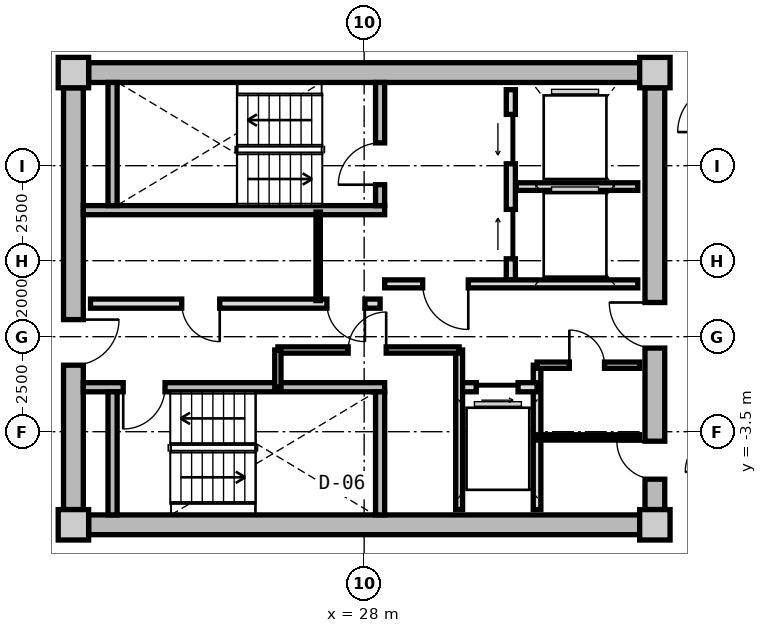
"""IFC4 building model, lengths in metres.
Left out: names, types, materials, properties, quantities, classifications, styles, units other than length and angle.
Written with IfcOpenShell. Run it as: python <this file> out.ifc"""

import sys

from ifc_helpers import new_model, si_unit, direction, frame, frame_2d, origin, origin_2d, place, context, subcontext, project, spatial, rectangle, extrude, source, transform, mapped, element, fill, save


model = new_model("IFC4")
c1 = context("Model", 3, precision=1e-05, world=origin(), true_north=direction((0.0, 1.0)))
c2 = subcontext(c1, "Body", "Model", "MODEL_VIEW")
j1 = project(units=[si_unit("LENGTHUNIT", "METRE"), si_unit("PLANEANGLEUNIT", "RADIAN")], contexts=[c1])
p1 = place(None, origin())
s1 = spatial("IfcSite", under=j1, at=p1, CompositionType="ELEMENT")
p2 = place(p1, origin())
s2 = spatial("IfcBuilding", under=s1, at=p2, CompositionType="ELEMENT")
p3 = place(p2, frame((0.0, 0.0, 226.1)))
s3 = spatial("IfcBuildingStorey", under=s2, at=p3, CompositionType="ELEMENT", Elevation=226.1)
m1 = source(origin(), c2, "Body", "SweptSolid", [
    extrude(rectangle(XDim=0.8, YDim=0.8, at=origin_2d()), origin(), (0.0, 0.0, 1.0), 3.05),
])
for number, where, z_axis, x_axis in (
    (1, (20.35, -5.95, 0.0), (0.0, 0.0, 1.0), (1.0, 0.0, 0.0)),
    (2, (35.65, -5.95, 0.0), (0.0, 0.0, 1.0), (1.0, 0.0, 0.0)),
    (3, (35.65, 5.95, 0.0), (0.0, 0.0, 1.0), (1.0, 0.0, 0.0)),
    (4, (20.35, 5.95, 0.0), (0.0, 0.0, 1.0), (1.0, 0.0, 0.0)),
):
    element("IfcColumn", number, at=place(p3, frame(where, z_axis=z_axis, x_axis=x_axis)), inside=s3, PredefinedType="COLUMN", context=c2, shape_type="MappedRepresentation", body=[
        mapped(m1, transform((0.0, 0.0, 0.0), x_axis=(1.0, 0.0, 0.0), y_axis=(0.0, 1.0, 0.0), z_axis=(0.0, 0.0, 1.0), scale=1.0)),
    ])
m2 = source(origin(), c2, "Body", "SweptSolid", [
    extrude(rectangle(XDim=14.5, YDim=0.52, at=frame_2d((7.25, 0.0))), origin(), (0.0, 0.0, 1.0), 2.76),
])
for number, where, z_axis, x_axis in (
    (5, (20.75, 5.95, 0.0), (0.0, 0.0, 1.0), (1.0, 0.0, 0.0)),
    (6, (35.25, -5.95, 0.0), (0.0, 0.0, 1.0), (-1.0, 0.0, 0.0)),
):
    element("IfcWall", number, at=place(p3, frame(where, z_axis=z_axis, x_axis=x_axis)), inside=s3, PredefinedType="SHEAR", context=c2, shape_type="MappedRepresentation", body=[
        mapped(m2, transform((0.0, 0.0, 0.0), x_axis=(1.0, 0.0, 0.0), y_axis=(0.0, 1.0, 0.0), z_axis=(0.0, 0.0, 1.0), scale=1.0)),
    ])
m3 = source(origin(), c2, "Body", "SweptSolid", [
    extrude(rectangle(XDim=11.1, YDim=0.52, at=frame_2d((5.55, 0.0))), origin(), (0.0, 0.0, 1.0), 2.76),
])
p4 = place(p3, frame((20.35, -5.55, 0.0), z_axis=(0.0, 0.0, 1.0), x_axis=(0.0, 1.0, 0.0)))
e7 = element("IfcWall", 7, at=p4, inside=s3, PredefinedType="SHEAR", context=c2, shape_type="MappedRepresentation", body=[
    mapped(m3, transform((0.0, 0.0, 0.0), x_axis=(1.0, 0.0, 0.0), y_axis=(0.0, 1.0, 0.0), z_axis=(0.0, 0.0, 1.0), scale=1.0)),
])
p5 = place(p4, frame((3.8, 0.0, 0.0)))
e8 = element("IfcOpeningElement", 8, at=p5, cuts=e7, PredefinedType="OPENING", context=c2, shape_type="SweptSolid", body=[
    extrude(rectangle(XDim=1.2, YDim=2.15, at=frame_2d((0.6, 1.075))), frame((0.0, 0.27, 0.0), z_axis=(0.0, -1.0, 0.0), x_axis=(1.0, 0.0, 0.0)), (0.0, 0.0, 1.0), 0.54),
])
p6 = place(p3, frame((35.65, 5.55, 0.0), z_axis=(0.0, 0.0, 1.0), x_axis=(0.0, -1.0, 0.0)))
e9 = element("IfcWall", 9, at=p6, inside=s3, PredefinedType="SHEAR", context=c2, shape_type="MappedRepresentation", body=[
    mapped(m3, transform((0.0, 0.0, 0.0), x_axis=(1.0, 0.0, 0.0), y_axis=(0.0, 1.0, 0.0), z_axis=(0.0, 0.0, 1.0), scale=1.0)),
])
p7 = place(p6, frame((5.65, 0.0, 0.0)))
e10 = element("IfcOpeningElement", 10, at=p7, cuts=e9, PredefinedType="OPENING", context=c2, shape_type="SweptSolid", body=[
    extrude(rectangle(XDim=1.2, YDim=2.15, at=frame_2d((0.6, 1.075))), frame((0.0, 0.27, 0.0), z_axis=(0.0, -1.0, 0.0), x_axis=(1.0, 0.0, 0.0)), (0.0, 0.0, 1.0), 0.54),
])
p8 = place(p6, frame((9.3, 0.0, 0.0)))
e11 = element("IfcOpeningElement", 11, at=p8, cuts=e9, PredefinedType="OPENING", context=c2, shape_type="SweptSolid", body=[
    extrude(rectangle(XDim=1.0, YDim=2.1, at=frame_2d((0.5, 1.05))), frame((0.0, 0.27, 0.0), z_axis=(0.0, -1.0, 0.0), x_axis=(1.0, 0.0, 0.0)), (0.0, 0.0, 1.0), 0.54),
])
m4 = source(origin(), c2, "Body", "SweptSolid", [
    extrude(rectangle(XDim=7.93, YDim=0.24, at=frame_2d((3.965, 0.0))), origin(), (0.0, 0.0, 1.0), 2.76),
])
p9 = place(p3, frame((20.61, 2.33, 0.0), z_axis=(0.0, 0.0, 1.0), x_axis=(1.0, 0.0, 0.0)))
e12 = element("IfcWall", 12, at=p9, inside=s3, PredefinedType="PARTITIONING", context=c2, shape_type="MappedRepresentation", body=[
    mapped(m4, transform((0.0, 0.0, 0.0), x_axis=(1.0, 0.0, 0.0), y_axis=(0.0, 1.0, 0.0), z_axis=(0.0, 0.0, 1.0), scale=1.0)),
])
m5 = source(origin(), c2, "Body", "SweptSolid", [
    extrude(rectangle(XDim=3.24, YDim=0.24, at=frame_2d((1.62, 0.0))), origin(), (0.0, 0.0, 1.0), 2.76),
])
p10 = place(p3, frame((21.38, 2.45, 0.0), z_axis=(0.0, 0.0, 1.0), x_axis=(0.0, 1.0, 0.0)))
e13 = element("IfcWall", 13, at=p10, inside=s3, PredefinedType="PARTITIONING", context=c2, shape_type="MappedRepresentation", body=[
    mapped(m5, transform((0.0, 0.0, 0.0), x_axis=(1.0, 0.0, 0.0), y_axis=(0.0, 1.0, 0.0), z_axis=(0.0, 0.0, 1.0), scale=1.0)),
])
p11 = place(p3, frame((28.42, 2.45, 0.0), z_axis=(0.0, 0.0, 1.0), x_axis=(0.0, 1.0, 0.0)))
e14 = element("IfcWall", 14, at=p11, inside=s3, PredefinedType="PARTITIONING", context=c2, shape_type="MappedRepresentation", body=[
    mapped(m5, transform((0.0, 0.0, 0.0), x_axis=(1.0, 0.0, 0.0), y_axis=(0.0, 1.0, 0.0), z_axis=(0.0, 0.0, 1.0), scale=1.0)),
])
p12 = place(p11, frame((0.55, 0.0, 0.0)))
e15 = element("IfcOpeningElement", 15, at=p12, cuts=e14, PredefinedType="OPENING", context=c2, shape_type="SweptSolid", body=[
    extrude(rectangle(XDim=1.1, YDim=2.15, at=frame_2d((0.55, 1.075))), frame((0.0, 0.13, 0.0), z_axis=(0.0, -1.0, 0.0), x_axis=(1.0, 0.0, 0.0)), (0.0, 0.0, 1.0), 0.26),
])
p13 = place(p3, frame((20.61, -2.33, 0.0), z_axis=(0.0, 0.0, 1.0), x_axis=(1.0, 0.0, 0.0)))
e16 = element("IfcWall", 16, at=p13, inside=s3, PredefinedType="PARTITIONING", context=c2, shape_type="MappedRepresentation", body=[
    mapped(m4, transform((0.0, 0.0, 0.0), x_axis=(1.0, 0.0, 0.0), y_axis=(0.0, 1.0, 0.0), z_axis=(0.0, 0.0, 1.0), scale=1.0)),
])
p14 = place(p13, frame((1.05, 0.0, 0.0)))
e17 = element("IfcOpeningElement", 17, at=p14, cuts=e16, PredefinedType="OPENING", context=c2, shape_type="SweptSolid", body=[
    extrude(rectangle(XDim=1.1, YDim=2.15, at=frame_2d((0.55, 1.075))), frame((0.0, 0.13, 0.0), z_axis=(0.0, -1.0, 0.0), x_axis=(1.0, 0.0, 0.0)), (0.0, 0.0, 1.0), 0.26),
])
for number, where, z_axis, x_axis in (
    (18, (21.38, -5.69, 0.0), (0.0, 0.0, 1.0), (0.0, 1.0, 0.0)),
    (19, (28.42, -5.69, 0.0), (0.0, 0.0, 1.0), (0.0, 1.0, 0.0)),
):
    element("IfcWall", number, at=place(p3, frame(where, z_axis=z_axis, x_axis=x_axis)), inside=s3, PredefinedType="PARTITIONING", context=c2, shape_type="MappedRepresentation", body=[
        mapped(m5, transform((0.0, 0.0, 0.0), x_axis=(1.0, 0.0, 0.0), y_axis=(0.0, 1.0, 0.0), z_axis=(0.0, 0.0, 1.0), scale=1.0)),
    ])
m6 = source(origin(), c2, "Body", "SweptSolid", [
    extrude(rectangle(XDim=5.0, YDim=0.24, at=frame_2d((2.5, 0.0))), origin(), (0.0, 0.0, 1.0), 2.745),
])
p15 = place(p3, frame((31.86, 0.5, 0.0), z_axis=(0.0, 0.0, 1.0), x_axis=(0.0, 1.0, 0.0)))
e20 = element("IfcWall", 20, at=p15, inside=s3, PredefinedType="PARTITIONING", context=c2, shape_type="MappedRepresentation", body=[
    mapped(m6, transform((0.0, 0.0, 0.0), x_axis=(1.0, 0.0, 0.0), y_axis=(0.0, 1.0, 0.0), z_axis=(0.0, 0.0, 1.0), scale=1.0)),
])
p16 = place(p15, frame((3.05, 0.0, 0.0)))
e21 = element("IfcOpeningElement", 21, at=p16, cuts=e20, PredefinedType="OPENING", context=c2, shape_type="SweptSolid", body=[
    extrude(rectangle(XDim=1.3, YDim=2.2, at=frame_2d((0.65, 1.1))), frame((0.0, 0.13, 0.0), z_axis=(0.0, -1.0, 0.0), x_axis=(1.0, 0.0, 0.0)), (0.0, 0.0, 1.0), 0.26),
])
p17 = place(p15, frame((0.55, 0.0, 0.0)))
e22 = element("IfcOpeningElement", 22, at=p17, cuts=e20, PredefinedType="OPENING", context=c2, shape_type="SweptSolid", body=[
    extrude(rectangle(XDim=1.3, YDim=2.2, at=frame_2d((0.65, 1.1))), frame((0.0, 0.13, 0.0), z_axis=(0.0, -1.0, 0.0), x_axis=(1.0, 0.0, 0.0)), (0.0, 0.0, 1.0), 0.26),
])
m7 = source(origin(), c2, "Body", "SweptSolid", [
    extrude(rectangle(XDim=3.2, YDim=0.2, at=frame_2d((1.6, 0.0))), origin(), (0.0, 0.0, 1.0), 2.745),
])
p18 = place(p3, frame((32.0, 2.95, 0.0), z_axis=(0.0, 0.0, 1.0), x_axis=(1.0, 0.0, 0.0)))
e23 = element("IfcWall", 23, at=p18, inside=s3, PredefinedType="PARTITIONING", context=c2, shape_type="MappedRepresentation", body=[
    mapped(m7, transform((0.0, 0.0, 0.0), x_axis=(1.0, 0.0, 0.0), y_axis=(0.0, 1.0, 0.0), z_axis=(0.0, 0.0, 1.0), scale=1.0)),
])
m8 = source(origin(), c2, "Body", "SweptSolid", [
    extrude(rectangle(XDim=6.66, YDim=0.21, at=frame_2d((3.33, 0.0))), origin(), (0.0, 0.0, 1.0), 2.745),
])
p19 = place(p3, frame((28.54, 0.39, 0.0), z_axis=(0.0, 0.0, 1.0), x_axis=(1.0, 0.0, 0.0)))
e24 = element("IfcWall", 24, at=p19, inside=s3, PredefinedType="PARTITIONING", context=c2, shape_type="MappedRepresentation", body=[
    mapped(m8, transform((0.0, 0.0, 0.0), x_axis=(1.0, 0.0, 0.0), y_axis=(0.0, 1.0, 0.0), z_axis=(0.0, 0.0, 1.0), scale=1.0)),
])
p20 = place(p19, frame((1.0, 0.0, 0.0)))
e25 = element("IfcOpeningElement", 25, at=p20, cuts=e24, PredefinedType="OPENING", context=c2, shape_type="SweptSolid", body=[
    extrude(rectangle(XDim=1.2, YDim=2.15, at=frame_2d((0.6, 1.075))), frame((0.0, 0.115, 0.0), z_axis=(0.0, -1.0, 0.0), x_axis=(1.0, 0.0, 0.0)), (0.0, 0.0, 1.0), 0.23),
])
m9 = source(origin(), c2, "Body", "SweptSolid", [
    extrude(rectangle(XDim=7.62, YDim=0.24, at=frame_2d((3.81, 0.0))), origin(), (0.0, 0.0, 1.0), 2.745),
])
p21 = place(p3, frame((20.8, -0.13, 0.0), z_axis=(0.0, 0.0, 1.0), x_axis=(1.0, 0.0, 0.0)))
e26 = element("IfcWall", 26, at=p21, inside=s3, PredefinedType="PARTITIONING", context=c2, shape_type="MappedRepresentation", body=[
    mapped(m9, transform((0.0, 0.0, 0.0), x_axis=(1.0, 0.0, 0.0), y_axis=(0.0, 1.0, 0.0), z_axis=(0.0, 0.0, 1.0), scale=1.0)),
])
p22 = place(p21, frame((6.22, 0.0, 0.0)))
e27 = element("IfcOpeningElement", 27, at=p22, cuts=e26, PredefinedType="OPENING", context=c2, shape_type="SweptSolid", body=[
    extrude(rectangle(XDim=1.0, YDim=2.1, at=frame_2d((0.5, 1.05))), frame((0.0, 0.13, 0.0), z_axis=(0.0, -1.0, 0.0), x_axis=(1.0, 0.0, 0.0)), (0.0, 0.0, 1.0), 0.26),
])
p23 = place(p21, frame((2.4, 0.0, 0.0)))
e28 = element("IfcOpeningElement", 28, at=p23, cuts=e26, PredefinedType="OPENING", context=c2, shape_type="SweptSolid", body=[
    extrude(rectangle(XDim=1.0, YDim=2.1, at=frame_2d((0.5, 1.05))), frame((0.0, 0.13, 0.0), z_axis=(0.0, -1.0, 0.0), x_axis=(1.0, 0.0, 0.0)), (0.0, 0.0, 1.0), 0.26),
])
m10 = source(origin(), c2, "Body", "SweptSolid", [
    extrude(rectangle(XDim=2.33, YDim=0.115, at=frame_2d((1.165, 0.0))), origin(), (0.0, 0.0, 1.0), 2.745),
])
p24 = place(p3, frame((26.79, -0.05, 0.0), z_axis=(0.0, 0.0, 1.0), x_axis=(0.0, 1.0, 0.0)))
e29 = element("IfcWall", 29, at=p24, inside=s3, PredefinedType="PARTITIONING", context=c2, shape_type="MappedRepresentation", body=[
    mapped(m10, transform((0.0, 0.0, 0.0), x_axis=(1.0, 0.0, 0.0), y_axis=(0.0, 1.0, 0.0), z_axis=(0.0, 0.0, 1.0), scale=1.0)),
])
m11 = source(origin(), c2, "Body", "SweptSolid", [
    extrude(rectangle(XDim=3.8, YDim=0.2, at=frame_2d((1.9, 0.0))), origin(), (0.0, 0.0, 1.0), 2.745),
])
p25 = place(p3, frame((32.55, -5.55, 0.0), z_axis=(0.0, 0.0, 1.0), x_axis=(0.0, 1.0, 0.0)))
e30 = element("IfcWall", 30, at=p25, inside=s3, PredefinedType="PARTITIONING", context=c2, shape_type="MappedRepresentation", body=[
    mapped(m11, transform((0.0, 0.0, 0.0), x_axis=(1.0, 0.0, 0.0), y_axis=(0.0, 1.0, 0.0), z_axis=(0.0, 0.0, 1.0), scale=1.0)),
])
m12 = source(origin(), c2, "Body", "SweptSolid", [
    extrude(rectangle(XDim=2.05, YDim=0.24, at=frame_2d((1.025, 0.0))), origin(), (0.0, 0.0, 1.0), 2.745),
])
p26 = place(p3, frame((30.5, -2.33, 0.0), z_axis=(0.0, 0.0, 1.0), x_axis=(1.0, 0.0, 0.0)))
e31 = element("IfcWall", 31, at=p26, inside=s3, PredefinedType="PARTITIONING", context=c2, shape_type="MappedRepresentation", body=[
    mapped(m12, transform((0.0, 0.0, 0.0), x_axis=(1.0, 0.0, 0.0), y_axis=(0.0, 1.0, 0.0), z_axis=(0.0, 0.0, 1.0), scale=1.0)),
])
p27 = place(p26, frame((0.45, 0.0, 0.0)))
e32 = element("IfcOpeningElement", 32, at=p27, cuts=e31, PredefinedType="OPENING", context=c2, shape_type="SweptSolid", body=[
    extrude(rectangle(XDim=1.1, YDim=2.2, at=frame_2d((0.55, 1.1))), frame((0.0, 0.13, 0.0), z_axis=(0.0, -1.0, 0.0), x_axis=(1.0, 0.0, 0.0)), (0.0, 0.0, 1.0), 0.26),
])
m13 = source(origin(), c2, "Body", "SweptSolid", [
    extrude(rectangle(XDim=4.2, YDim=0.18, at=frame_2d((2.1, 0.0))), origin(), (0.0, 0.0, 1.0), 2.745),
])
p28 = place(p3, frame((30.5, -5.55, 0.0), z_axis=(0.0, 0.0, 1.0), x_axis=(0.0, 1.0, 0.0)))
e33 = element("IfcWall", 33, at=p28, inside=s3, PredefinedType="PARTITIONING", context=c2, shape_type="MappedRepresentation", body=[
    mapped(m13, transform((0.0, 0.0, 0.0), x_axis=(1.0, 0.0, 0.0), y_axis=(0.0, 1.0, 0.0), z_axis=(0.0, 0.0, 1.0), scale=1.0)),
])
m14 = source(origin(), c2, "Body", "SweptSolid", [
    extrude(rectangle(XDim=4.77, YDim=0.165, at=frame_2d((2.385, 0.0))), origin(), (0.0, 0.0, 1.0), 2.745),
])
p29 = place(p3, frame((25.73, -1.35, 0.0), z_axis=(0.0, 0.0, 1.0), x_axis=(1.0, 0.0, 0.0)))
e34 = element("IfcWall", 34, at=p29, inside=s3, PredefinedType="PARTITIONING", context=c2, shape_type="MappedRepresentation", body=[
    mapped(m14, transform((0.0, 0.0, 0.0), x_axis=(1.0, 0.0, 0.0), y_axis=(0.0, 1.0, 0.0), z_axis=(0.0, 0.0, 1.0), scale=1.0)),
])
p30 = place(p29, frame((1.85, 0.0, 0.0)))
e35 = element("IfcOpeningElement", 35, at=p30, cuts=e34, PredefinedType="OPENING", context=c2, shape_type="SweptSolid", body=[
    extrude(rectangle(XDim=1.0, YDim=2.1, at=frame_2d((0.5, 1.05))), frame((0.0, 0.093, 0.0), z_axis=(0.0, -1.0, 0.0), x_axis=(1.0, 0.0, 0.0)), (0.0, 0.0, 1.0), 0.185),
])
m15 = source(origin(), c2, "Body", "SweptSolid", [
    extrude(rectangle(XDim=0.98, YDim=0.165, at=frame_2d((0.49, 0.0))), origin(), (0.0, 0.0, 1.0), 2.745),
])
p31 = place(p3, frame((25.73, -2.33, 0.0), z_axis=(0.0, 0.0, 1.0), x_axis=(0.0, 1.0, 0.0)))
e36 = element("IfcWall", 36, at=p31, inside=s3, PredefinedType="PARTITIONING", context=c2, shape_type="MappedRepresentation", body=[
    mapped(m15, transform((0.0, 0.0, 0.0), x_axis=(1.0, 0.0, 0.0), y_axis=(0.0, 1.0, 0.0), z_axis=(0.0, 0.0, 1.0), scale=1.0)),
])
m16 = source(origin(), c2, "Body", "SweptSolid", [
    extrude(rectangle(XDim=2.7, YDim=0.165, at=frame_2d((1.35, 0.0))), origin(), (0.0, 0.0, 1.0), 2.745),
])
p32 = place(p3, frame((32.55, -1.75, 0.0), z_axis=(0.0, 0.0, 1.0), x_axis=(1.0, 0.0, 0.0)))
e37 = element("IfcWall", 37, at=p32, inside=s3, PredefinedType="PARTITIONING", context=c2, shape_type="MappedRepresentation", body=[
    mapped(m16, transform((0.0, 0.0, 0.0), x_axis=(1.0, 0.0, 0.0), y_axis=(0.0, 1.0, 0.0), z_axis=(0.0, 0.0, 1.0), scale=1.0)),
])
p33 = place(p32, frame((0.85, 0.0, 0.0)))
e38 = element("IfcOpeningElement", 38, at=p33, cuts=e37, PredefinedType="OPENING", context=c2, shape_type="SweptSolid", body=[
    extrude(rectangle(XDim=0.925, YDim=2.1, at=frame_2d((0.462, 1.05))), frame((0.0, 0.093, 0.0), z_axis=(0.0, -1.0, 0.0), x_axis=(1.0, 0.0, 0.0)), (0.0, 0.0, 1.0), 0.185),
])
m17 = source(origin(), c2, "Body", "SweptSolid", [
    extrude(rectangle(XDim=2.7, YDim=0.14, at=frame_2d((1.35, 0.0))), origin(), (0.0, 0.0, 1.0), 2.745),
])
p34 = place(p3, frame((32.55, -3.65, 0.0), z_axis=(0.0, 0.0, 1.0), x_axis=(1.0, 0.0, 0.0)))
e39 = element("IfcWall", 39, at=p34, inside=s3, PredefinedType="PARTITIONING", context=c2, shape_type="MappedRepresentation", body=[
    mapped(m17, transform((0.0, 0.0, 0.0), x_axis=(1.0, 0.0, 0.0), y_axis=(0.0, 1.0, 0.0), z_axis=(0.0, 0.0, 1.0), scale=1.0)),
])
m18 = source(origin(), c2, "Body", "SweptSolid", [
    extrude(rectangle(XDim=1.1, YDim=2.15, at=frame_2d((0.55, 1.075))), frame((0.0, 0.025, 0.0), z_axis=(0.0, -1.0, 0.0), x_axis=(1.0, 0.0, 0.0)), (0.0, 0.0, 1.0), 0.05),
])
p35 = place(p12, origin())
e40 = element("IfcDoor", 40, at=p35, inside=s3, OperationType="SINGLE_SWING_LEFT", PredefinedType="DOOR", context=c2, shape_type="MappedRepresentation", body=[
    mapped(m18, transform((0.0, 0.0, 0.0), x_axis=(1.0, 0.0, 0.0), y_axis=(0.0, 1.0, 0.0), z_axis=(0.0, 0.0, 1.0), scale=1.0)),
])
fill(e15, e40)
p36 = place(p14, frame((1.1, 0.0, 0.0), z_axis=(0.0, 0.0, 1.0), x_axis=(-1.0, 0.0, 0.0)))
e41 = element("IfcDoor", 41, at=p36, inside=s3, OperationType="SINGLE_SWING_RIGHT", PredefinedType="DOOR", context=c2, shape_type="MappedRepresentation", body=[
    mapped(m18, transform((0.0, 0.0, 0.0), x_axis=(1.0, 0.0, 0.0), y_axis=(0.0, 1.0, 0.0), z_axis=(0.0, 0.0, 1.0), scale=1.0)),
])
fill(e17, e41)
m19 = source(origin(), c2, "Body", "SweptSolid", [
    extrude(rectangle(XDim=1.3, YDim=2.2, at=frame_2d((0.65, 1.1))), frame((0.0, 0.025, 0.0), z_axis=(0.0, -1.0, 0.0), x_axis=(1.0, 0.0, 0.0)), (0.0, 0.0, 1.0), 0.05),
])
p37 = place(p16, origin())
e42 = element("IfcDoor", 42, at=p37, inside=s3, OperationType="SLIDING_TO_LEFT", PredefinedType="DOOR", context=c2, shape_type="MappedRepresentation", body=[
    mapped(m19, transform((0.0, 0.0, 0.0), x_axis=(1.0, 0.0, 0.0), y_axis=(0.0, 1.0, 0.0), z_axis=(0.0, 0.0, 1.0), scale=1.0)),
])
fill(e21, e42)
p38 = place(p17, origin())
e43 = element("IfcDoor", 43, at=p38, inside=s3, OperationType="SLIDING_TO_RIGHT", PredefinedType="DOOR", context=c2, shape_type="MappedRepresentation", body=[
    mapped(m19, transform((0.0, 0.0, 0.0), x_axis=(1.0, 0.0, 0.0), y_axis=(0.0, 1.0, 0.0), z_axis=(0.0, 0.0, 1.0), scale=1.0)),
])
fill(e22, e43)
m20 = source(origin(), c2, "Body", "SweptSolid", [
    extrude(rectangle(XDim=1.2, YDim=2.15, at=frame_2d((0.6, 1.075))), frame((0.0, 0.025, 0.0), z_axis=(0.0, -1.0, 0.0), x_axis=(1.0, 0.0, 0.0)), (0.0, 0.0, 1.0), 0.05),
])
p39 = place(p20, frame((1.2, 0.0, 0.0), z_axis=(0.0, 0.0, 1.0), x_axis=(-1.0, 0.0, 0.0)))
e44 = element("IfcDoor", 44, at=p39, inside=s3, OperationType="SINGLE_SWING_LEFT", PredefinedType="DOOR", context=c2, shape_type="MappedRepresentation", body=[
    mapped(m20, transform((0.0, 0.0, 0.0), x_axis=(1.0, 0.0, 0.0), y_axis=(0.0, 1.0, 0.0), z_axis=(0.0, 0.0, 1.0), scale=1.0)),
])
fill(e25, e44)
p40 = place(p5, frame((1.2, 0.0, 0.0), z_axis=(0.0, 0.0, 1.0), x_axis=(-1.0, 0.0, 0.0)))
e45 = element("IfcDoor", 45, at=p40, inside=s3, OperationType="SINGLE_SWING_LEFT", PredefinedType="DOOR", context=c2, shape_type="MappedRepresentation", body=[
    mapped(m20, transform((0.0, 0.0, 0.0), x_axis=(1.0, 0.0, 0.0), y_axis=(0.0, 1.0, 0.0), z_axis=(0.0, 0.0, 1.0), scale=1.0)),
])
fill(e8, e45)
p41 = place(p7, frame((1.2, 0.0, 0.0), z_axis=(0.0, 0.0, 1.0), x_axis=(-1.0, 0.0, 0.0)))
e46 = element("IfcDoor", 46, at=p41, inside=s3, OperationType="SINGLE_SWING_RIGHT", PredefinedType="DOOR", context=c2, shape_type="MappedRepresentation", body=[
    mapped(m20, transform((0.0, 0.0, 0.0), x_axis=(1.0, 0.0, 0.0), y_axis=(0.0, 1.0, 0.0), z_axis=(0.0, 0.0, 1.0), scale=1.0)),
])
fill(e10, e46)
m21 = source(origin(), c2, "Body", "SweptSolid", [
    extrude(rectangle(XDim=1.0, YDim=2.1, at=frame_2d((0.5, 1.05))), frame((0.0, 0.025, 0.0), z_axis=(0.0, -1.0, 0.0), x_axis=(1.0, 0.0, 0.0)), (0.0, 0.0, 1.0), 0.05),
])
p42 = place(p22, frame((1.0, 0.0, 0.0), z_axis=(0.0, 0.0, 1.0), x_axis=(-1.0, 0.0, 0.0)))
e47 = element("IfcDoor", 47, at=p42, inside=s3, OperationType="SINGLE_SWING_LEFT", PredefinedType="DOOR", context=c2, shape_type="MappedRepresentation", body=[
    mapped(m21, transform((0.0, 0.0, 0.0), x_axis=(1.0, 0.0, 0.0), y_axis=(0.0, 1.0, 0.0), z_axis=(0.0, 0.0, 1.0), scale=1.0)),
])
fill(e27, e47)
p43 = place(p23, frame((1.0, 0.0, 0.0), z_axis=(0.0, 0.0, 1.0), x_axis=(-1.0, 0.0, 0.0)))
e48 = element("IfcDoor", 48, at=p43, inside=s3, OperationType="SINGLE_SWING_LEFT", PredefinedType="DOOR", context=c2, shape_type="MappedRepresentation", body=[
    mapped(m21, transform((0.0, 0.0, 0.0), x_axis=(1.0, 0.0, 0.0), y_axis=(0.0, 1.0, 0.0), z_axis=(0.0, 0.0, 1.0), scale=1.0)),
])
fill(e28, e48)
m22 = source(origin(), c2, "Body", "SweptSolid", [
    extrude(rectangle(XDim=1.1, YDim=2.2, at=frame_2d((0.55, 1.1))), frame((0.0, 0.025, 0.0), z_axis=(0.0, -1.0, 0.0), x_axis=(1.0, 0.0, 0.0)), (0.0, 0.0, 1.0), 0.05),
])
p44 = place(p27, frame((1.1, 0.0, 0.0), z_axis=(0.0, 0.0, 1.0), x_axis=(-1.0, 0.0, 0.0)))
e49 = element("IfcDoor", 49, at=p44, inside=s3, OperationType="SLIDING_TO_RIGHT", PredefinedType="DOOR", context=c2, shape_type="MappedRepresentation", body=[
    mapped(m22, transform((0.0, 0.0, 0.0), x_axis=(1.0, 0.0, 0.0), y_axis=(0.0, 1.0, 0.0), z_axis=(0.0, 0.0, 1.0), scale=1.0)),
])
fill(e32, e49)
p45 = place(p30, origin())
e50 = element("IfcDoor", 50, at=p45, inside=s3, OperationType="SINGLE_SWING_RIGHT", PredefinedType="DOOR", context=c2, shape_type="MappedRepresentation", body=[
    mapped(m21, transform((0.0, 0.0, 0.0), x_axis=(1.0, 0.0, 0.0), y_axis=(0.0, 1.0, 0.0), z_axis=(0.0, 0.0, 1.0), scale=1.0)),
])
fill(e35, e50)
m23 = source(origin(), c2, "Body", "SweptSolid", [
    extrude(rectangle(XDim=0.925, YDim=2.1, at=frame_2d((0.462, 1.05))), frame((0.0, 0.025, 0.0), z_axis=(0.0, -1.0, 0.0), x_axis=(1.0, 0.0, 0.0)), (0.0, 0.0, 1.0), 0.05),
])
p46 = place(p33, origin())
e51 = element("IfcDoor", 51, at=p46, inside=s3, OperationType="SINGLE_SWING_LEFT", PredefinedType="DOOR", context=c2, shape_type="MappedRepresentation", body=[
    mapped(m23, transform((0.0, 0.0, 0.0), x_axis=(1.0, 0.0, 0.0), y_axis=(0.0, 1.0, 0.0), z_axis=(0.0, 0.0, 1.0), scale=1.0)),
])
fill(e38, e51)
p47 = place(p8, frame((1.0, 0.0, 0.0), z_axis=(0.0, 0.0, 1.0), x_axis=(-1.0, 0.0, 0.0)))
e52 = element("IfcDoor", 52, at=p47, inside=s3, OperationType="SINGLE_SWING_RIGHT", PredefinedType="DOOR", context=c2, shape_type="MappedRepresentation", body=[
    mapped(m21, transform((0.0, 0.0, 0.0), x_axis=(1.0, 0.0, 0.0), y_axis=(0.0, 1.0, 0.0), z_axis=(0.0, 0.0, 1.0), scale=1.0)),
])
fill(e11, e52)
save(model, sys.argv[1])
